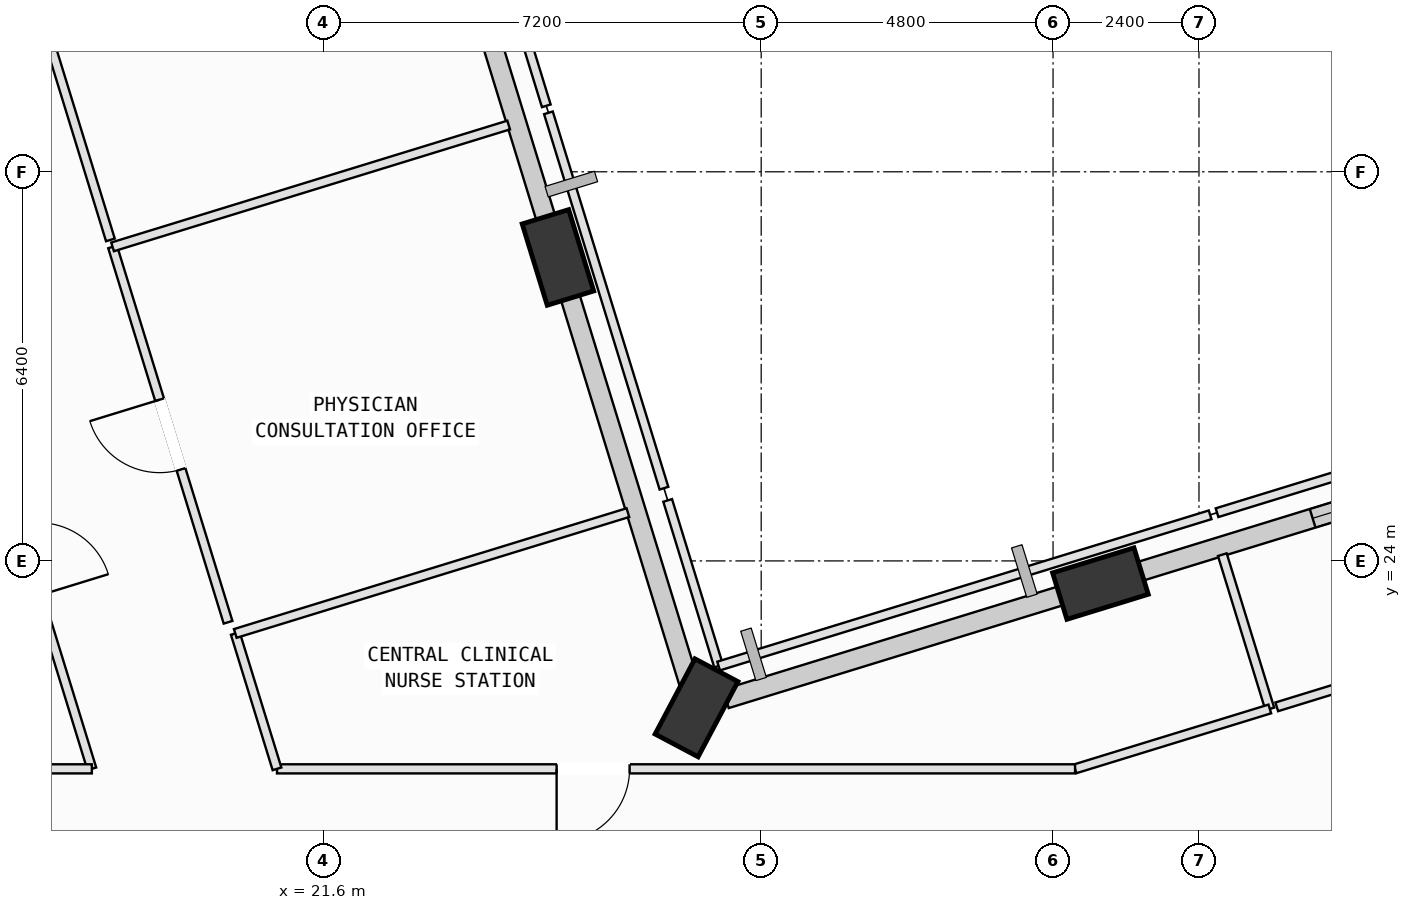
"""IFC4 building model, lengths in metres.
Left out: names, types, materials, properties, quantities, classifications, styles, units other than length and angle.
Written with IfcOpenShell. Run it as: python <this file> out.ifc"""

import sys

from ifc_helpers import new_model, si_unit, direction, frame, frame_2d, origin, origin_2d, place, context, subcontext, project, spatial, rectangle, extrude, element, fill, save


model = new_model("IFC4")
c1 = context("Model", 3, precision=1e-05, world=origin(), true_north=direction((0.0, 1.0)))
c2 = subcontext(c1, "Body", "Model", "MODEL_VIEW")
j1 = project(units=[si_unit("LENGTHUNIT", "METRE"), si_unit("PLANEANGLEUNIT", "RADIAN")], contexts=[c1])
p1 = place(None, origin())
s1 = spatial("IfcSite", under=j1, at=p1, CompositionType="ELEMENT")
p2 = place(p1, origin())
s2 = spatial("IfcBuilding", under=s1, at=p2, CompositionType="ELEMENT")
p3 = place(p2, frame((0.0, 0.0, 96.4)))
s3 = spatial("IfcBuildingStorey", under=s2, at=p3, CompositionType="ELEMENT", Elevation=96.4)
p4 = place(p3, frame((34.379, 23.627, 0.002), z_axis=(0.004826113392, 0.003298862319, 0.999982912922), x_axis=(-0.782107631441, 0.62314099382, 0.001718913142)))
e1 = element("IfcColumn", 1, at=p4, inside=s3, PredefinedType="COLUMN", context=c2, shape_type="SweptSolid", body=[
    extrude(rectangle(XDim=1.4, YDim=0.8, at=origin_2d()), origin(), (0.0, 0.0, 1.0), 3.996),
])
p5 = place(p3, frame((27.737, 21.584, 0.002), z_axis=(0.013495951859, -0.024182791566, 0.999616452383), x_axis=(-0.021912267051, 0.999460271394, 0.024474853595)))
e2 = element("IfcColumn", 2, at=p5, inside=s3, PredefinedType="COLUMN", context=c2, shape_type="SweptSolid", body=[
    extrude(rectangle(XDim=1.4, YDim=0.8, at=origin_2d()), origin(), (0.0, 0.0, 1.0), 3.998),
])
p6 = place(p3, frame((25.458, 28.991, 0.002), z_axis=(-0.017093218306, -0.033820153363, 0.999281751617), x_axis=(0.168398647055, 0.985053333216, 0.036219143978)))
e3 = element("IfcColumn", 3, at=p6, inside=s3, PredefinedType="COLUMN", context=c2, shape_type="SweptSolid", body=[
    extrude(rectangle(XDim=1.4, YDim=0.8, at=origin_2d()), origin(), (0.0, 0.0, 1.0), 3.999),
])
p7 = place(p3, frame((34.864, 23.777, 0.0), z_axis=(0.0, 0.0, 1.0), x_axis=(0.955799403791, 0.294019556685, 0.0)))
e4 = element("IfcWall", 4, at=p7, inside=s3, PredefinedType="SOLIDWALL", context=c2, shape_type="SweptSolid", body=[
    extrude(rectangle(XDim=6.211, YDim=0.32, at=frame_2d((3.105, 0.0))), origin(), (0.0, 0.0, 1.0), 3.165),
])
p8 = place(p7, frame((3.144, 0.0, 0.75)))
e5 = element("IfcOpeningElement", 5, at=p8, cuts=e4, PredefinedType="OPENING", context=c2, shape_type="SweptSolid", body=[
    extrude(rectangle(XDim=1.8, YDim=2.05, at=frame_2d((0.9, 1.025))), frame((0.0, 0.17, 0.0), z_axis=(0.0, -1.0, 0.0), x_axis=(1.0, 0.0, 0.0)), (0.0, 0.0, 1.0), 0.34),
])
p9 = place(p3, frame((28.219, 21.732, 0.0), z_axis=(0.0, 0.0, 1.0), x_axis=(0.955798491071, 0.294022523738, 0.0)))
e6 = element("IfcWall", 6, at=p9, inside=s3, PredefinedType="SOLIDWALL", context=c2, shape_type="SweptSolid", body=[
    extrude(rectangle(XDim=5.96, YDim=0.32, at=frame_2d((2.98, 0.0))), origin(), (0.0, 0.0, 1.0), 3.165),
])
p10 = place(p3, frame((25.619, 28.467, 0.0), z_axis=(0.0, 0.0, 1.0), x_axis=(0.294050319043, -0.955789940244, 0.0)))
e7 = element("IfcWall", 7, at=p10, inside=s3, PredefinedType="SOLIDWALL", context=c2, shape_type="SweptSolid", body=[
    extrude(rectangle(XDim=6.76, YDim=0.32, at=frame_2d((3.38, 0.0))), origin(), (0.0, 0.0, 1.0), 2.965),
])
p11 = place(p3, frame((23.499, 35.358, 0.0), z_axis=(0.0, 0.0, 1.0), x_axis=(0.294025193447, -0.955797669812, 0.0)))
e8 = element("IfcWall", 8, at=p11, inside=s3, PredefinedType="SOLIDWALL", context=c2, shape_type="SweptSolid", body=[
    extrude(rectangle(XDim=6.223, YDim=0.32, at=frame_2d((3.111, 0.0))), origin(), (0.0, 0.0, 1.0), 3.165),
])
p12 = place(p11, frame((1.009, 0.0, 0.75)))
e9 = element("IfcOpeningElement", 9, at=p12, cuts=e8, PredefinedType="OPENING", context=c2, shape_type="SweptSolid", body=[
    extrude(rectangle(XDim=2.0, YDim=1.95, at=frame_2d((1.0, 0.975))), frame((0.0, 0.17, 0.0), z_axis=(0.0, -1.0, 0.0), x_axis=(1.0, 0.0, 0.0)), (0.0, 0.0, 1.0), 0.34),
])
p13 = place(p3, frame((38.03, 18.891, 0.0), z_axis=(0.0, 0.0, 1.0), x_axis=(0.955772926222, 0.294105616236, 0.0)))
e10 = element("IfcWall", 10, at=p13, inside=s3, PredefinedType="PARTITIONING", context=c2, shape_type="SweptSolid", body=[
    extrude(rectangle(XDim=6.943, YDim=0.15, at=frame_2d((3.472, 0.0))), origin(), (0.0, 0.0, 1.0), 2.945),
])
p14 = place(p13, frame((2.872, 0.0, 0.0)))
e11 = element("IfcOpeningElement", 11, at=p14, cuts=e10, PredefinedType="OPENING", context=c2, shape_type="SweptSolid", body=[
    extrude(rectangle(XDim=1.2, YDim=2.15, at=frame_2d((0.6, 1.075))), frame((0.0, 0.085, 0.0), z_axis=(0.0, -1.0, 0.0), x_axis=(1.0, 0.0, 0.0)), (0.0, 0.0, 1.0), 0.17),
])
p15 = place(p3, frame((15.687, 27.424, 0.0), z_axis=(0.0, 0.0, 1.0), x_axis=(0.293975633895, -0.955812914056, 0.0)))
e12 = element("IfcWall", 12, at=p15, inside=s3, PredefinedType="PARTITIONING", context=c2, shape_type="SweptSolid", body=[
    extrude(rectangle(XDim=7.16, YDim=0.15, at=frame_2d((3.58, 0.0))), origin(), (0.0, 0.0, 1.0), 3.78),
])
p16 = place(p15, frame((2.98, 0.0, 0.0)))
e13 = element("IfcOpeningElement", 13, at=p16, cuts=e12, PredefinedType="OPENING", context=c2, shape_type="SweptSolid", body=[
    extrude(rectangle(XDim=1.2, YDim=2.15, at=frame_2d((0.6, 1.075))), frame((0.0, 0.085, 0.0), z_axis=(0.0, -1.0, 0.0), x_axis=(1.0, 0.0, 0.0)), (0.0, 0.0, 1.0), 0.17),
])
p17 = place(p3, frame((17.792, 20.58, 0.0), z_axis=(0.0, 0.0, 1.0), x_axis=(-1.0, 0.0, 0.0)))
e14 = element("IfcWall", 14, at=p17, inside=s3, PredefinedType="PARTITIONING", context=c2, shape_type="SweptSolid", body=[
    extrude(rectangle(XDim=2.795, YDim=0.15, at=frame_2d((1.397, 0.0))), origin(), (0.0, 0.0, 1.0), 3.78),
])
p18 = place(p3, frame((36.384, 24.103, 0.0), z_axis=(0.0, 0.0, 1.0), x_axis=(0.294105230009, -0.955773045069, 0.0)))
e15 = element("IfcWall", 15, at=p18, inside=s3, PredefinedType="PARTITIONING", context=c2, shape_type="SweptSolid", body=[
    extrude(rectangle(XDim=2.656, YDim=0.15, at=frame_2d((1.328, 0.0))), origin(), (0.0, 0.0, 1.0), 3.78),
])
p19 = place(p3, frame((37.165, 21.565, 0.0), z_axis=(0.0, 0.0, 1.0), x_axis=(-0.955838846993, -0.293891304022, 0.0)))
e16 = element("IfcWall", 16, at=p19, inside=s3, PredefinedType="PARTITIONING", context=c2, shape_type="SweptSolid", body=[
    extrude(rectangle(XDim=3.351, YDim=0.15, at=frame_2d((1.676, 0.0))), origin(), (0.0, 0.0, 1.0), 3.78),
])
p20 = place(p3, frame((33.962, 20.58, 0.0), z_axis=(0.0, 0.0, 1.0), x_axis=(-1.0, 0.0, 0.0)))
e17 = element("IfcWall", 17, at=p20, inside=s3, PredefinedType="PARTITIONING", context=c2, shape_type="SweptSolid", body=[
    extrude(rectangle(XDim=13.125, YDim=0.15, at=frame_2d((6.562, 0.0))), origin(), (0.0, 0.0, 1.0), 3.78),
])
p21 = place(p20, frame((7.326, 0.0, 0.0)))
e18 = element("IfcOpeningElement", 18, at=p21, cuts=e17, PredefinedType="OPENING", context=c2, shape_type="SweptSolid", body=[
    extrude(rectangle(XDim=1.2, YDim=2.15, at=frame_2d((0.6, 1.075))), frame((0.0, 0.085, 0.0), z_axis=(0.0, -1.0, 0.0), x_axis=(1.0, 0.0, 0.0)), (0.0, 0.0, 1.0), 0.17),
])
p22 = place(p3, frame((20.837, 20.58, 0.0), z_axis=(0.0, 0.0, 1.0), x_axis=(-0.294424516265, 0.955674737671, 0.0)))
e19 = element("IfcWall", 19, at=p22, inside=s3, PredefinedType="PARTITIONING", context=c2, shape_type="SweptSolid", body=[
    extrude(rectangle(XDim=2.33, YDim=0.15, at=frame_2d((1.165, 0.0))), origin(), (0.0, 0.0, 1.0), 3.78),
])
p23 = place(p3, frame((20.151, 22.807, 0.0), z_axis=(0.0, 0.0, 1.0), x_axis=(0.95576728766, 0.294123939589, 0.0)))
e20 = element("IfcWall", 20, at=p23, inside=s3, PredefinedType="PARTITIONING", context=c2, shape_type="SweptSolid", body=[
    extrude(rectangle(XDim=6.756, YDim=0.15, at=frame_2d((3.378, 0.0))), origin(), (0.0, 0.0, 1.0), 3.78),
])
p24 = place(p3, frame((27.262, 24.995, 0.0), z_axis=(0.0, 0.0, 1.0), x_axis=(0.294067790915, -0.955784564819, 0.0)))
e21 = element("IfcWall", 21, at=p24, inside=s3, PredefinedType="PARTITIONING", context=c2, shape_type="SweptSolid", body=[
    extrude(rectangle(XDim=2.85, YDim=0.15, at=frame_2d((1.425, 0.0))), origin(), (0.0, 0.0, 1.0), 3.78),
])
p25 = place(p3, frame((28.1, 22.271, 0.0), z_axis=(0.0, 0.0, 1.0), x_axis=(0.955779632904, 0.294083820237, 0.0)))
e22 = element("IfcWall", 22, at=p25, inside=s3, PredefinedType="PARTITIONING", context=c2, shape_type="SweptSolid", body=[
    extrude(rectangle(XDim=8.457, YDim=0.15, at=frame_2d((4.229, 0.0))), origin(), (0.0, 0.0, 1.0), 3.78),
])
p26 = place(p3, frame((48.994, 25.204, 0.0), z_axis=(0.0, 0.0, 1.0), x_axis=(-0.955791928213, -0.294043857208, 0.0)))
e23 = element("IfcWall", 23, at=p26, inside=s3, PredefinedType="PARTITIONING", context=c2, shape_type="SweptSolid", body=[
    extrude(rectangle(XDim=12.257, YDim=0.15, at=frame_2d((6.128, 0.0))), origin(), (0.0, 0.0, 1.0), 2.945),
])
p27 = place(p26, frame((5.528, 0.0, 0.0)))
e24 = element("IfcOpeningElement", 24, at=p27, cuts=e23, PredefinedType="OPENING", context=c2, shape_type="SweptSolid", body=[
    extrude(rectangle(XDim=1.2, YDim=2.15, at=frame_2d((0.6, 1.075))), frame((0.0, 0.085, 0.0), z_axis=(0.0, -1.0, 0.0), x_axis=(1.0, 0.0, 0.0)), (0.0, 0.0, 1.0), 0.17),
])
p28 = place(p3, frame((36.297, 24.793, 0.0), z_axis=(0.0, 0.0, 1.0), x_axis=(0.955791928213, 0.294043857208, 0.0)))
e25 = element("IfcWall", 25, at=p28, inside=s3, PredefinedType="PARTITIONING", context=c2, shape_type="SweptSolid", body=[
    extrude(rectangle(XDim=12.257, YDim=0.15, at=frame_2d((6.128, 0.0))), origin(), (0.0, 0.0, 1.0), 3.145),
])
p29 = place(p3, frame((20.032, 22.991, 0.0), z_axis=(0.0, 0.0, 1.0), x_axis=(-0.293974298693, 0.955813324718, 0.0)))
e26 = element("IfcWall", 26, at=p29, inside=s3, PredefinedType="PARTITIONING", context=c2, shape_type="SweptSolid", body=[
    extrude(rectangle(XDim=6.459, YDim=0.15, at=frame_2d((3.23, 0.0))), origin(), (0.0, 0.0, 1.0), 3.78),
])
p30 = place(p29, frame((2.63, 0.0, 0.0)))
e27 = element("IfcOpeningElement", 27, at=p30, cuts=e26, PredefinedType="OPENING", context=c2, shape_type="SweptSolid", body=[
    extrude(rectangle(XDim=1.2, YDim=2.15, at=frame_2d((0.6, 1.075))), frame((0.0, 0.085, 0.0), z_axis=(0.0, -1.0, 0.0), x_axis=(1.0, 0.0, 0.0)), (0.0, 0.0, 1.0), 0.17),
])
p31 = place(p3, frame((18.133, 29.165, 0.0), z_axis=(0.0, 0.0, 1.0), x_axis=(0.95579449844, 0.294035502537, 0.0)))
e28 = element("IfcWall", 28, at=p31, inside=s3, PredefinedType="PARTITIONING", context=c2, shape_type="SweptSolid", body=[
    extrude(rectangle(XDim=6.815, YDim=0.15, at=frame_2d((3.408, 0.0))), origin(), (0.0, 0.0, 1.0), 3.78),
])
p32 = place(p3, frame((25.301, 31.37, 0.0), z_axis=(0.0, 0.0, 1.0), x_axis=(0.294112406625, -0.955770836691, 0.0)))
e29 = element("IfcWall", 29, at=p32, inside=s3, PredefinedType="PARTITIONING", context=c2, shape_type="SweptSolid", body=[
    extrude(rectangle(XDim=6.46, YDim=0.15, at=frame_2d((3.23, 0.0))), origin(), (0.0, 0.0, 1.0), 3.78),
])
p33 = place(p3, frame((18.097, 29.28, 0.0), z_axis=(0.0, 0.0, 1.0), x_axis=(-0.29400973267, 0.955802425763, 0.0)))
e30 = element("IfcWall", 30, at=p33, inside=s3, PredefinedType="PARTITIONING", context=c2, shape_type="SweptSolid", body=[
    extrude(rectangle(XDim=8.34, YDim=0.15, at=frame_2d((4.17, 0.0))), origin(), (0.0, 0.0, 1.0), 3.78),
])
p34 = place(p33, frame((3.71, 0.0, 0.0)))
e31 = element("IfcOpeningElement", 31, at=p34, cuts=e30, PredefinedType="OPENING", context=c2, shape_type="SweptSolid", body=[
    extrude(rectangle(XDim=0.92, YDim=2.1, at=frame_2d((0.46, 1.05))), frame((0.0, 0.085, 0.0), z_axis=(0.0, -1.0, 0.0), x_axis=(1.0, 0.0, 0.0)), (0.0, 0.0, 1.0), 0.17),
])
p35 = place(p3, frame((22.814, 39.456, 0.0), z_axis=(0.0, 0.0, 1.0), x_axis=(0.294036476826, -0.955794198714, 0.0)))
e32 = element("IfcWall", 32, at=p35, inside=s3, PredefinedType="PARTITIONING", context=c2, shape_type="SweptSolid", body=[
    extrude(rectangle(XDim=8.34, YDim=0.15, at=frame_2d((4.17, 0.0))), origin(), (0.0, 0.0, 1.0), 3.78),
])
p36 = place(p8, origin())
e33 = element("IfcWindow", 33, at=p36, inside=s3, PartitioningType="SINGLE_PANEL", PredefinedType="WINDOW", context=c2, shape_type="SweptSolid", body=[
    extrude(rectangle(XDim=1.8, YDim=2.05, at=frame_2d((0.9, 1.025))), frame((0.0, 0.03, 0.0), z_axis=(0.0, -1.0, 0.0), x_axis=(1.0, 0.0, 0.0)), (0.0, 0.0, 1.0), 0.06),
])
fill(e5, e33)
p37 = place(p21, origin())
e34 = element("IfcDoor", 34, at=p37, inside=s3, OperationType="SINGLE_SWING_RIGHT", PredefinedType="DOOR", context=c2, shape_type="SweptSolid", body=[
    extrude(rectangle(XDim=1.2, YDim=2.15, at=frame_2d((0.6, 1.075))), frame((0.0, 0.025, 0.0), z_axis=(0.0, -1.0, 0.0), x_axis=(1.0, 0.0, 0.0)), (0.0, 0.0, 1.0), 0.05),
])
fill(e18, e34)
p38 = place(p30, origin())
e35 = element("IfcDoor", 35, at=p38, inside=s3, OperationType="SINGLE_SWING_RIGHT", PredefinedType="DOOR", context=c2, shape_type="SweptSolid", body=[
    extrude(rectangle(XDim=1.2, YDim=2.15, at=frame_2d((0.6, 1.075))), frame((0.0, 0.025, 0.0), z_axis=(0.0, -1.0, 0.0), x_axis=(1.0, 0.0, 0.0)), (0.0, 0.0, 1.0), 0.05),
])
fill(e27, e35)
save(model, sys.argv[1])
